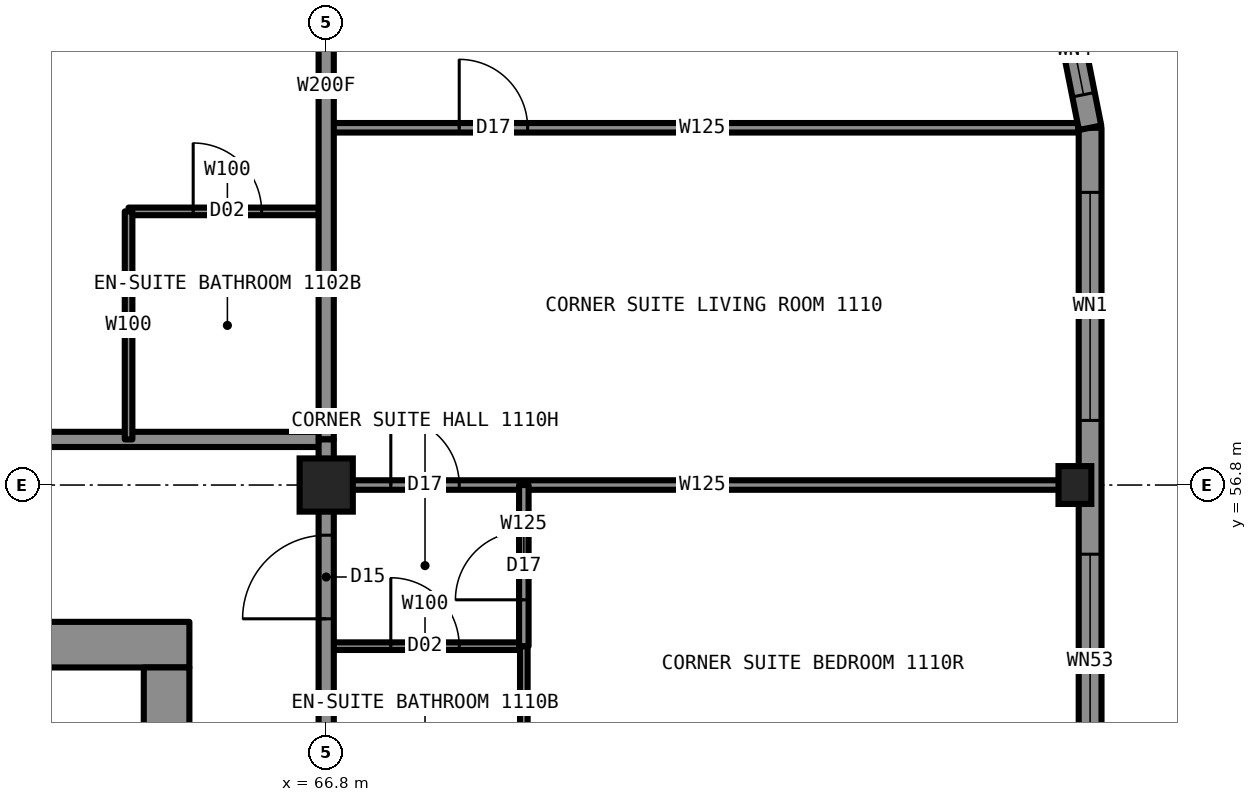
"""IFC4 building model, lengths in metres.
Left out: names, types, materials, properties, quantities, classifications, styles, units other than length and angle.
Written with IfcOpenShell. Run it as: python <this file> out.ifc"""

import sys

from ifc_helpers import new_model, si_unit, direction, frame, frame_2d, origin, origin_2d, place, context, subcontext, project, spatial, rectangle, hollow_rectangle, i_section, extrude, element, fill, save


model = new_model("IFC4")
c1 = context("Model", 3, precision=1e-05, world=origin(), true_north=direction((0.0, 1.0)))
c2 = subcontext(c1, "Body", "Model", "MODEL_VIEW")
j1 = project(units=[si_unit("LENGTHUNIT", "METRE"), si_unit("PLANEANGLEUNIT", "RADIAN")], contexts=[c1])
p1 = place(None, origin())
s1 = spatial("IfcSite", under=j1, at=p1, CompositionType="ELEMENT")
p2 = place(p1, origin())
s2 = spatial("IfcBuilding", under=s1, at=p2, CompositionType="ELEMENT")
p3 = place(p2, frame((0.0, 0.0, 39.0)))
s3 = spatial("IfcBuildingStorey", under=s2, at=p3, CompositionType="ELEMENT", Elevation=39.0)
p4 = place(p3, frame((76.65, 56.8, 0.0), z_axis=(0.0, 0.0, 1.0), x_axis=(1.0, 0.0, 0.0)))
e1 = element("IfcColumn", 1, at=p4, inside=s3, PredefinedType="COLUMN", context=c2, shape_type="SweptSolid", body=[
    extrude(i_section(OverallWidth=0.432, OverallDepth=0.498, WebThickness=0.056, FlangeThickness=0.089, at=origin_2d()), origin(), (0.0, 0.0, 1.0), 3.5),
])
p5 = place(p3, frame((66.8, 56.8, 0.0), z_axis=(0.0, 0.0, 1.0), x_axis=(1.0, 0.0, 0.0)))
e2 = element("IfcColumn", 2, at=p5, inside=s3, PredefinedType="COLUMN", context=c2, shape_type="SweptSolid", body=[
    extrude(hollow_rectangle(XDim=0.7, YDim=0.7, WallThickness=0.06, at=origin_2d()), origin(), (0.0, 0.0, 1.0), 3.5),
])
p6 = place(p3, frame((45.0, 54.7, 0.0), z_axis=(0.0, 0.0, 1.0), x_axis=(1.0, 0.0, 0.0)))
e3 = element("IfcWall", 3, at=p6, inside=s3, PredefinedType="SHEAR", context=c2, shape_type="SweptSolid", body=[
    extrude(rectangle(XDim=20.0, YDim=0.6, at=frame_2d((10.0, 0.0))), origin(), (0.0, 0.0, 1.0), 3.5),
])
p7 = place(p3, frame((64.7, 35.6, 0.0), z_axis=(0.0, 0.0, 1.0), x_axis=(0.0, 1.0, 0.0)))
e4 = element("IfcWall", 4, at=p7, inside=s3, PredefinedType="SHEAR", context=c2, shape_type="SweptSolid", body=[
    extrude(rectangle(XDim=18.8, YDim=0.6, at=frame_2d((9.4, 0.0))), origin(), (0.0, 0.0, 1.0), 3.5),
])
p8 = place(p7, frame((13.4, 0.0, 0.0)))
e5 = element("IfcOpeningElement", 5, at=p8, cuts=e4, PredefinedType="OPENING", context=c2, shape_type="SweptSolid", body=[
    extrude(rectangle(XDim=1.8, YDim=2.2, at=frame_2d((0.9, 1.1))), frame((0.0, 0.31, 0.0), z_axis=(0.0, -1.0, 0.0), x_axis=(1.0, 0.0, 0.0)), (0.0, 0.0, 1.0), 0.62),
])
p9 = place(p7, frame((3.6, 0.0, 0.0)))
e6 = element("IfcOpeningElement", 6, at=p9, cuts=e4, PredefinedType="OPENING", context=c2, shape_type="SweptSolid", body=[
    extrude(rectangle(XDim=1.8, YDim=2.2, at=frame_2d((0.9, 1.1))), frame((0.0, 0.31, 0.0), z_axis=(0.0, -1.0, 0.0), x_axis=(1.0, 0.0, 0.0)), (0.0, 0.0, 1.0), 0.62),
])
p10 = place(p3, frame((66.8, 56.8, 0.0), z_axis=(0.0, 0.0, 1.0), x_axis=(1.0, 0.0, 0.0)))
e7 = element("IfcWall", 7, at=p10, inside=s3, PredefinedType="PARTITIONING", context=c2, shape_type="SweptSolid", body=[
    extrude(rectangle(XDim=9.9, YDim=0.125, at=frame_2d((4.95, 0.0))), origin(), (0.0, 0.0, 1.0), 2.573),
])
p11 = place(p10, frame((0.85, 0.0, 0.0)))
e8 = element("IfcOpeningElement", 8, at=p11, cuts=e7, PredefinedType="OPENING", context=c2, shape_type="SweptSolid", body=[
    extrude(rectangle(XDim=0.9, YDim=2.2, at=frame_2d((0.45, 1.1))), frame((0.0, 0.073, 0.0), z_axis=(0.0, -1.0, 0.0), x_axis=(1.0, 0.0, 0.0)), (0.0, 0.0, 1.0), 0.145),
])
p12 = place(p3, frame((43.2, 57.4, 0.0), z_axis=(0.0, 0.0, 1.0), x_axis=(1.0, 0.0, 0.0)))
e9 = element("IfcWall", 9, at=p12, inside=s3, PredefinedType="PARTITIONING", context=c2, shape_type="SweptSolid", body=[
    extrude(rectangle(XDim=23.6, YDim=0.2, at=frame_2d((11.8, 0.0))), origin(), (0.0, 0.0, 1.0), 3.33),
])
p13 = place(p12, frame((3.0, 0.0, 0.0)))
e10 = element("IfcOpeningElement", 10, at=p13, cuts=e9, PredefinedType="OPENING", context=c2, shape_type="SweptSolid", body=[
    extrude(rectangle(XDim=1.0, YDim=2.2, at=frame_2d((0.5, 1.1))), frame((0.0, 0.11, 0.0), z_axis=(0.0, -1.0, 0.0), x_axis=(1.0, 0.0, 0.0)), (0.0, 0.0, 1.0), 0.22),
])
p14 = place(p12, frame((11.29, 0.0, 0.0)))
e11 = element("IfcOpeningElement", 11, at=p14, cuts=e9, PredefinedType="OPENING", context=c2, shape_type="SweptSolid", body=[
    extrude(rectangle(XDim=1.1, YDim=2.2, at=frame_2d((0.55, 1.1))), frame((0.0, 0.11, 0.0), z_axis=(0.0, -1.0, 0.0), x_axis=(1.0, 0.0, 0.0)), (0.0, 0.0, 1.0), 0.22),
])
p15 = place(p3, frame((64.2, 60.4, 0.0), z_axis=(0.0, 0.0, 1.0), x_axis=(1.0, 0.0, 0.0)))
e12 = element("IfcWall", 12, at=p15, inside=s3, PredefinedType="PARTITIONING", context=c2, shape_type="SweptSolid", body=[
    extrude(rectangle(XDim=2.6, YDim=0.1, at=frame_2d((1.3, 0.0))), origin(), (0.0, 0.0, 1.0), 3.33),
])
p16 = place(p15, frame((0.85, 0.0, 0.0)))
e13 = element("IfcOpeningElement", 13, at=p16, cuts=e12, PredefinedType="OPENING", context=c2, shape_type="SweptSolid", body=[
    extrude(rectangle(XDim=0.9, YDim=2.1, at=frame_2d((0.45, 1.05))), frame((0.0, 0.06, 0.0), z_axis=(0.0, -1.0, 0.0), x_axis=(1.0, 0.0, 0.0)), (0.0, 0.0, 1.0), 0.12),
])
p17 = place(p3, frame((66.8, 61.5, 0.0), z_axis=(0.0, 0.0, 1.0), x_axis=(1.0, 0.0, 0.0)))
e14 = element("IfcWall", 14, at=p17, inside=s3, PredefinedType="PARTITIONING", context=c2, shape_type="SweptSolid", body=[
    extrude(rectangle(XDim=9.894, YDim=0.125, at=frame_2d((4.947, 0.0))), origin(), (0.0, 0.0, 1.0), 3.33),
])
p18 = place(p17, frame((1.75, 0.0, 0.0)))
e15 = element("IfcOpeningElement", 15, at=p18, cuts=e14, PredefinedType="OPENING", context=c2, shape_type="SweptSolid", body=[
    extrude(rectangle(XDim=0.9, YDim=2.2, at=frame_2d((0.45, 1.1))), frame((0.0, 0.073, 0.0), z_axis=(0.0, -1.0, 0.0), x_axis=(1.0, 0.0, 0.0)), (0.0, 0.0, 1.0), 0.145),
])
p19 = place(p3, frame((66.8, 54.68, 0.0), z_axis=(0.0, 0.0, 1.0), x_axis=(1.0, 0.0, 0.0)))
e16 = element("IfcWall", 16, at=p19, inside=s3, PredefinedType="PARTITIONING", context=c2, shape_type="SweptSolid", body=[
    extrude(rectangle(XDim=2.6, YDim=0.1, at=frame_2d((1.3, 0.0))), origin(), (0.0, 0.0, 1.0), 3.33),
])
p20 = place(p19, frame((0.85, 0.0, 0.0)))
e17 = element("IfcOpeningElement", 17, at=p20, cuts=e16, PredefinedType="OPENING", context=c2, shape_type="SweptSolid", body=[
    extrude(rectangle(XDim=0.9, YDim=2.1, at=frame_2d((0.45, 1.05))), frame((0.0, 0.06, 0.0), z_axis=(0.0, -1.0, 0.0), x_axis=(1.0, 0.0, 0.0)), (0.0, 0.0, 1.0), 0.12),
])
p21 = place(p3, frame((66.8, 33.2, 0.0), z_axis=(0.0, 0.0, 1.0), x_axis=(0.0, 1.0, 0.0)))
e18 = element("IfcWall", 18, at=p21, inside=s3, PredefinedType="PARTITIONING", context=c2, shape_type="SweptSolid", body=[
    extrude(rectangle(XDim=23.58, YDim=0.2, at=frame_2d((11.79, 0.0))), origin(), (0.0, 0.0, 1.0), 3.33),
])
p22 = place(p21, frame((7.72, 0.0, 0.0)))
e19 = element("IfcOpeningElement", 19, at=p22, cuts=e18, PredefinedType="OPENING", context=c2, shape_type="SweptSolid", body=[
    extrude(rectangle(XDim=1.0, YDim=2.2, at=frame_2d((0.5, 1.1))), frame((0.0, 0.11, 0.0), z_axis=(0.0, -1.0, 0.0), x_axis=(1.0, 0.0, 0.0)), (0.0, 0.0, 1.0), 0.22),
])
p23 = place(p21, frame((17.31, 0.0, 0.0)))
e20 = element("IfcOpeningElement", 20, at=p23, cuts=e18, PredefinedType="OPENING", context=c2, shape_type="SweptSolid", body=[
    extrude(rectangle(XDim=1.0, YDim=2.2, at=frame_2d((0.5, 1.1))), frame((0.0, 0.11, 0.0), z_axis=(0.0, -1.0, 0.0), x_axis=(1.0, 0.0, 0.0)), (0.0, 0.0, 1.0), 0.22),
])
p24 = place(p21, frame((21.84, 0.0, 0.0)))
e21 = element("IfcOpeningElement", 21, at=p24, cuts=e18, PredefinedType="OPENING", context=c2, shape_type="SweptSolid", body=[
    extrude(rectangle(XDim=1.1, YDim=2.2, at=frame_2d((0.55, 1.1))), frame((0.0, 0.11, 0.0), z_axis=(0.0, -1.0, 0.0), x_axis=(1.0, 0.0, 0.0)), (0.0, 0.0, 1.0), 0.22),
])
p25 = place(p21, frame((0.66, 0.0, 0.0)))
e22 = element("IfcOpeningElement", 22, at=p25, cuts=e18, PredefinedType="OPENING", context=c2, shape_type="SweptSolid", body=[
    extrude(rectangle(XDim=1.1, YDim=2.2, at=frame_2d((0.55, 1.1))), frame((0.0, 0.11, 0.0), z_axis=(0.0, -1.0, 0.0), x_axis=(1.0, 0.0, 0.0)), (0.0, 0.0, 1.0), 0.22),
])
p26 = place(p3, frame((66.8, 57.4, 0.0), z_axis=(0.0, 0.0, 1.0), x_axis=(0.0, 1.0, 0.0)))
e23 = element("IfcWall", 23, at=p26, inside=s3, PredefinedType="PARTITIONING", context=c2, shape_type="SweptSolid", body=[
    extrude(rectangle(XDim=9.3, YDim=0.2, at=frame_2d((4.65, 0.0))), origin(), (0.0, 0.0, 1.0), 2.573),
])
p27 = place(p3, frame((69.4, 52.08, 0.0), z_axis=(0.0, 0.0, 1.0), x_axis=(0.0, 1.0, 0.0)))
e24 = element("IfcWall", 24, at=p27, inside=s3, PredefinedType="PARTITIONING", context=c2, shape_type="SweptSolid", body=[
    extrude(rectangle(XDim=2.6, YDim=0.1, at=frame_2d((1.3, 0.0))), origin(), (0.0, 0.0, 1.0), 3.33),
])
p28 = place(p3, frame((69.4, 54.68, 0.0), z_axis=(0.0, 0.0, 1.0), x_axis=(0.0, 1.0, 0.0)))
e25 = element("IfcWall", 25, at=p28, inside=s3, PredefinedType="PARTITIONING", context=c2, shape_type="SweptSolid", body=[
    extrude(rectangle(XDim=2.12, YDim=0.125, at=frame_2d((1.06, 0.0))), origin(), (0.0, 0.0, 1.0), 3.33),
])
p29 = place(p28, frame((0.61, 0.0, 0.0)))
e26 = element("IfcOpeningElement", 26, at=p29, cuts=e25, PredefinedType="OPENING", context=c2, shape_type="SweptSolid", body=[
    extrude(rectangle(XDim=0.9, YDim=2.2, at=frame_2d((0.45, 1.1))), frame((0.0, 0.073, 0.0), z_axis=(0.0, -1.0, 0.0), x_axis=(1.0, 0.0, 0.0)), (0.0, 0.0, 1.0), 0.145),
])
p30 = place(p3, frame((64.2, 57.4, 0.0), z_axis=(0.0, 0.0, 1.0), x_axis=(0.0, 1.0, 0.0)))
e27 = element("IfcWall", 27, at=p30, inside=s3, PredefinedType="PARTITIONING", context=c2, shape_type="SweptSolid", body=[
    extrude(rectangle(XDim=3.0, YDim=0.1, at=frame_2d((1.5, 0.0))), origin(), (0.0, 0.0, 1.0), 3.33),
])
p31 = place(p3, frame((76.85, 28.5, 0.0), z_axis=(0.0, 0.0, 1.0), x_axis=(0.0, 1.0, 0.0)))
e28 = element("IfcWall", 28, at=p31, inside=s3, PredefinedType="SOLIDWALL", context=c2, shape_type="SweptSolid", body=[
    extrude(rectangle(XDim=33.0, YDim=0.3, at=frame_2d((16.5, 0.0))), origin(), (0.0, 0.0, 1.0), 2.83),
])
p32 = place(p31, frame((0.85, 0.0, 0.5)))
e29 = element("IfcOpeningElement", 29, at=p32, cuts=e28, PredefinedType="OPENING", context=c2, shape_type="SweptSolid", body=[
    extrude(rectangle(XDim=2.5, YDim=2.0, at=frame_2d((1.25, 1.0))), frame((0.0, 0.16, 0.0), z_axis=(0.0, -1.0, 0.0), x_axis=(1.0, 0.0, 0.0)), (0.0, 0.0, 1.0), 0.32),
])
p33 = place(p31, frame((6.61, 0.0, 0.5)))
e30 = element("IfcOpeningElement", 30, at=p33, cuts=e28, PredefinedType="OPENING", context=c2, shape_type="SweptSolid", body=[
    extrude(rectangle(XDim=1.9, YDim=1.9, at=frame_2d((0.95, 0.95))), frame((0.0, 0.16, 0.0), z_axis=(0.0, -1.0, 0.0), x_axis=(1.0, 0.0, 0.0)), (0.0, 0.0, 1.0), 0.32),
])
p34 = place(p31, frame((10.28, 0.0, 0.5)))
e31 = element("IfcOpeningElement", 31, at=p34, cuts=e28, PredefinedType="OPENING", context=c2, shape_type="SweptSolid", body=[
    extrude(rectangle(XDim=3.0, YDim=2.0, at=frame_2d((1.5, 1.0))), frame((0.0, 0.16, 0.0), z_axis=(0.0, -1.0, 0.0), x_axis=(1.0, 0.0, 0.0)), (0.0, 0.0, 1.0), 0.32),
])
p35 = place(p31, frame((15.0, 0.0, 0.5)))
e32 = element("IfcOpeningElement", 32, at=p35, cuts=e28, PredefinedType="OPENING", context=c2, shape_type="SweptSolid", body=[
    extrude(rectangle(XDim=3.0, YDim=2.0, at=frame_2d((1.5, 1.0))), frame((0.0, 0.16, 0.0), z_axis=(0.0, -1.0, 0.0), x_axis=(1.0, 0.0, 0.0)), (0.0, 0.0, 1.0), 0.32),
])
p36 = place(p31, frame((19.72, 0.0, 0.5)))
e33 = element("IfcOpeningElement", 33, at=p36, cuts=e28, PredefinedType="OPENING", context=c2, shape_type="SweptSolid", body=[
    extrude(rectangle(XDim=3.0, YDim=2.0, at=frame_2d((1.5, 1.0))), frame((0.0, 0.16, 0.0), z_axis=(0.0, -1.0, 0.0), x_axis=(1.0, 0.0, 0.0)), (0.0, 0.0, 1.0), 0.32),
])
p37 = place(p31, frame((24.44, 0.0, 0.5)))
e34 = element("IfcOpeningElement", 34, at=p37, cuts=e28, PredefinedType="OPENING", context=c2, shape_type="SweptSolid", body=[
    extrude(rectangle(XDim=1.9, YDim=1.9, at=frame_2d((0.95, 0.95))), frame((0.0, 0.16, 0.0), z_axis=(0.0, -1.0, 0.0), x_axis=(1.0, 0.0, 0.0)), (0.0, 0.0, 1.0), 0.32),
])
p38 = place(p31, frame((29.6, 0.0, 0.5)))
e35 = element("IfcOpeningElement", 35, at=p38, cuts=e28, PredefinedType="OPENING", context=c2, shape_type="SweptSolid", body=[
    extrude(rectangle(XDim=2.5, YDim=2.0, at=frame_2d((1.25, 1.0))), frame((0.0, 0.16, 0.0), z_axis=(0.0, -1.0, 0.0), x_axis=(1.0, 0.0, 0.0)), (0.0, 0.0, 1.0), 0.32),
])
p39 = place(p31, frame((5.91, 0.0, 0.5)))
e36 = element("IfcOpeningElement", 36, at=p39, cuts=e28, PredefinedType="OPENING", context=c2, shape_type="SweptSolid", body=[
    extrude(rectangle(XDim=0.7, YDim=1.0, at=frame_2d((0.35, 0.5))), frame((0.0, 0.16, 0.0), z_axis=(0.0, -1.0, 0.0), x_axis=(1.0, 0.0, 0.0)), (0.0, 0.0, 1.0), 0.32),
])
p40 = place(p31, frame((26.39, 0.0, 0.5)))
e37 = element("IfcOpeningElement", 37, at=p40, cuts=e28, PredefinedType="OPENING", context=c2, shape_type="SweptSolid", body=[
    extrude(rectangle(XDim=0.7, YDim=1.0, at=frame_2d((0.35, 0.5))), frame((0.0, 0.16, 0.0), z_axis=(0.0, -1.0, 0.0), x_axis=(1.0, 0.0, 0.0)), (0.0, 0.0, 1.0), 0.32),
])
p41 = place(p3, frame((76.85, 61.5, 0.0), z_axis=(0.0, 0.0, 1.0), x_axis=(-0.195081421501, 0.980787050784, 0.0)))
e38 = element("IfcWall", 38, at=p41, inside=s3, PredefinedType="SOLIDWALL", context=c2, shape_type="SweptSolid", body=[
    extrude(rectangle(XDim=2.087, YDim=0.3, at=frame_2d((1.044, 0.0))), origin(), (0.0, 0.0, 1.0), 3.33),
])
p42 = place(p41, frame((0.444, 0.0, 0.5)))
e39 = element("IfcOpeningElement", 39, at=p42, cuts=e38, PredefinedType="OPENING", context=c2, shape_type="SweptSolid", body=[
    extrude(rectangle(XDim=1.2, YDim=2.0, at=frame_2d((0.6, 1.0))), frame((0.0, 0.16, 0.0), z_axis=(0.0, -1.0, 0.0), x_axis=(1.0, 0.0, 0.0)), (0.0, 0.0, 1.0), 0.32),
])
p43 = place(p3, frame((66.8, 56.78, 0.0), z_axis=(0.0, 0.0, 1.0), x_axis=(0.0, 1.0, 0.0)))
e40 = element("IfcWall", 40, at=p43, inside=s3, PredefinedType="PARTITIONING", context=c2, shape_type="SweptSolid", body=[
    extrude(rectangle(XDim=0.62, YDim=0.2, at=frame_2d((0.31, 0.0))), origin(), (0.0, 0.0, 1.0), 2.573),
])
p44 = place(p16, origin())
e41 = element("IfcDoor", 41, at=p44, inside=s3, OperationType="SINGLE_SWING_RIGHT", PredefinedType="DOOR", context=c2, shape_type="SweptSolid", body=[
    extrude(rectangle(XDim=0.9, YDim=2.1, at=frame_2d((0.45, 1.05))), frame((0.0, 0.025, 0.0), z_axis=(0.0, -1.0, 0.0), x_axis=(1.0, 0.0, 0.0)), (0.0, 0.0, 1.0), 0.05),
])
fill(e13, e41)
p45 = place(p11, origin())
e42 = element("IfcDoor", 42, at=p45, inside=s3, OperationType="SINGLE_SWING_LEFT", PredefinedType="DOOR", context=c2, shape_type="SweptSolid", body=[
    extrude(rectangle(XDim=0.9, YDim=2.2, at=frame_2d((0.45, 1.1))), frame((0.0, 0.025, 0.0), z_axis=(0.0, -1.0, 0.0), x_axis=(1.0, 0.0, 0.0)), (0.0, 0.0, 1.0), 0.05),
])
fill(e8, e42)
p46 = place(p20, origin())
e43 = element("IfcDoor", 43, at=p46, inside=s3, OperationType="SINGLE_SWING_RIGHT", PredefinedType="DOOR", context=c2, shape_type="SweptSolid", body=[
    extrude(rectangle(XDim=0.9, YDim=2.1, at=frame_2d((0.45, 1.05))), frame((0.0, 0.025, 0.0), z_axis=(0.0, -1.0, 0.0), x_axis=(1.0, 0.0, 0.0)), (0.0, 0.0, 1.0), 0.05),
])
fill(e17, e43)
p47 = place(p24, origin())
e44 = element("IfcDoor", 44, at=p47, inside=s3, OperationType="SINGLE_SWING_LEFT", PredefinedType="DOOR", context=c2, shape_type="SweptSolid", body=[
    extrude(rectangle(XDim=1.1, YDim=2.2, at=frame_2d((0.55, 1.1))), frame((0.0, 0.025, 0.0), z_axis=(0.0, -1.0, 0.0), x_axis=(1.0, 0.0, 0.0)), (0.0, 0.0, 1.0), 0.05),
])
fill(e21, e44)
p48 = place(p18, origin())
e45 = element("IfcDoor", 45, at=p48, inside=s3, OperationType="SINGLE_SWING_LEFT", PredefinedType="DOOR", context=c2, shape_type="SweptSolid", body=[
    extrude(rectangle(XDim=0.9, YDim=2.2, at=frame_2d((0.45, 1.1))), frame((0.0, 0.025, 0.0), z_axis=(0.0, -1.0, 0.0), x_axis=(1.0, 0.0, 0.0)), (0.0, 0.0, 1.0), 0.05),
])
fill(e15, e45)
p49 = place(p29, origin())
e46 = element("IfcDoor", 46, at=p49, inside=s3, OperationType="SINGLE_SWING_LEFT", PredefinedType="DOOR", context=c2, shape_type="SweptSolid", body=[
    extrude(rectangle(XDim=0.9, YDim=2.2, at=frame_2d((0.45, 1.1))), frame((0.0, 0.025, 0.0), z_axis=(0.0, -1.0, 0.0), x_axis=(1.0, 0.0, 0.0)), (0.0, 0.0, 1.0), 0.05),
])
fill(e26, e46)
p50 = place(p37, origin())
e47 = element("IfcWindow", 47, at=p50, inside=s3, PartitioningType="SINGLE_PANEL", PredefinedType="WINDOW", context=c2, shape_type="SweptSolid", body=[
    extrude(rectangle(XDim=1.9, YDim=1.9, at=frame_2d((0.95, 0.95))), frame((0.0, 0.03, 0.0), z_axis=(0.0, -1.0, 0.0), x_axis=(1.0, 0.0, 0.0)), (0.0, 0.0, 1.0), 0.06),
])
fill(e34, e47)
p51 = place(p38, origin())
e48 = element("IfcWindow", 48, at=p51, inside=s3, PartitioningType="SINGLE_PANEL", PredefinedType="WINDOW", context=c2, shape_type="SweptSolid", body=[
    extrude(rectangle(XDim=2.5, YDim=2.0, at=frame_2d((1.25, 1.0))), frame((0.0, 0.03, 0.0), z_axis=(0.0, -1.0, 0.0), x_axis=(1.0, 0.0, 0.0)), (0.0, 0.0, 1.0), 0.06),
])
fill(e35, e48)
p52 = place(p42, origin())
e49 = element("IfcWindow", 49, at=p52, inside=s3, PartitioningType="SINGLE_PANEL", PredefinedType="WINDOW", context=c2, shape_type="SweptSolid", body=[
    extrude(rectangle(XDim=1.2, YDim=2.0, at=frame_2d((0.6, 1.0))), frame((0.0, 0.03, 0.0), z_axis=(0.0, -1.0, 0.0), x_axis=(1.0, 0.0, 0.0)), (0.0, 0.0, 1.0), 0.06),
])
fill(e39, e49)
p53 = place(p40, origin())
e50 = element("IfcWindow", 50, at=p53, inside=s3, PartitioningType="SINGLE_PANEL", PredefinedType="WINDOW", context=c2, shape_type="SweptSolid", body=[
    extrude(rectangle(XDim=0.7, YDim=1.0, at=frame_2d((0.35, 0.5))), frame((0.0, 0.03, 0.0), z_axis=(0.0, -1.0, 0.0), x_axis=(1.0, 0.0, 0.0)), (0.0, 0.0, 1.0), 0.06),
])
fill(e37, e50)
save(model, sys.argv[1])
